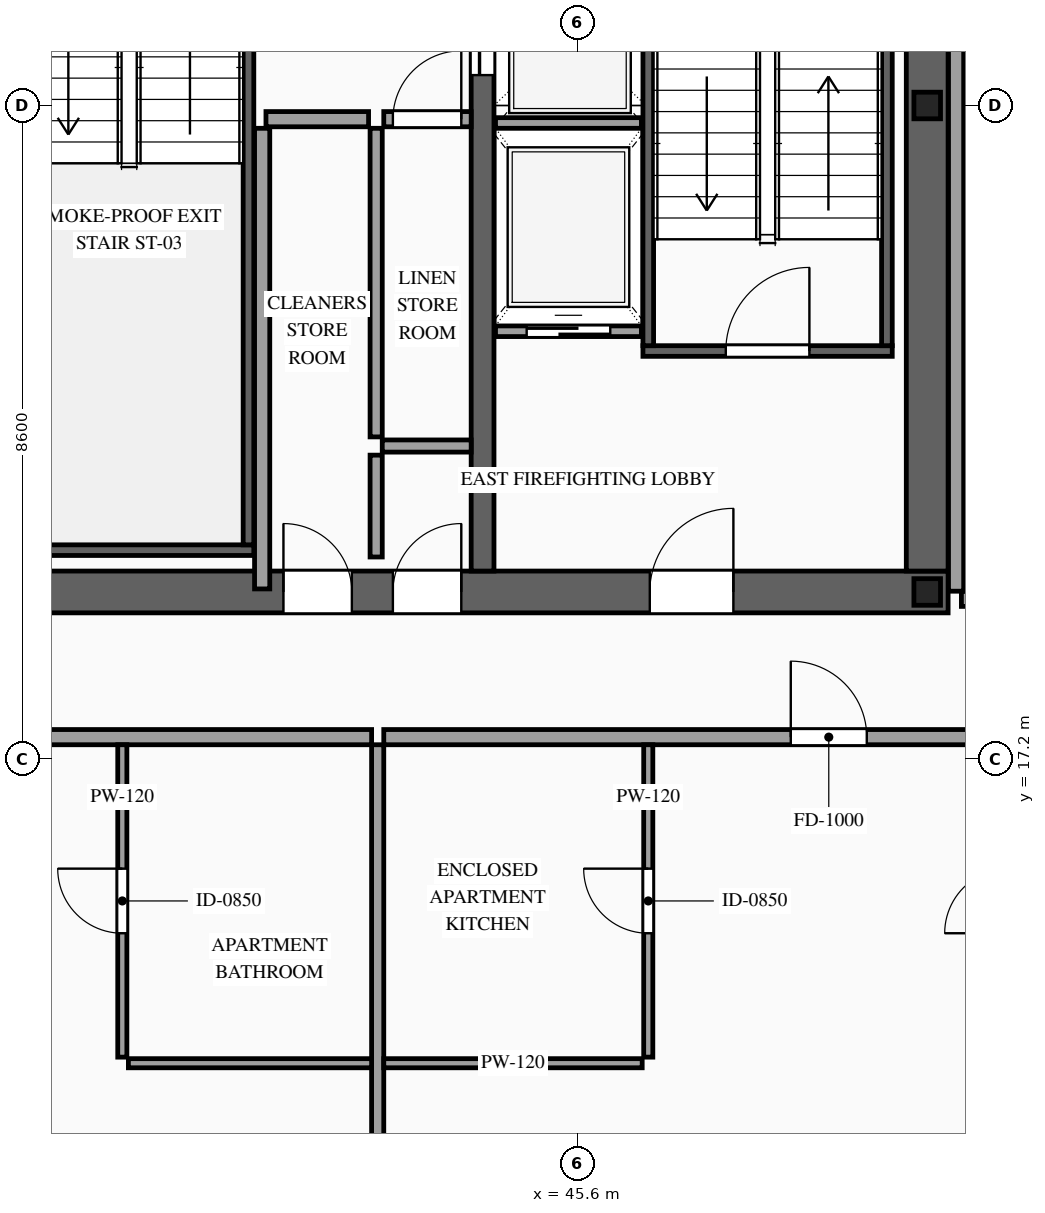
"""IFC4 building model, lengths in metres.
Left out: names, types, materials, properties, quantities, classifications, styles, units other than length and angle.
Written with IfcOpenShell. Run it as: python <this file> out.ifc"""

import sys

from ifc_helpers import new_model, si_unit, direction, frame, frame_2d, origin, origin_2d, place, context, subcontext, project, spatial, rectangle, i_section, extrude, source, transform, mapped, element, fill, save


model = new_model("IFC4")
c1 = context("Model", 3, precision=1e-05, world=origin(), true_north=direction((0.0, 1.0)))
c2 = subcontext(c1, "Body", "Model", "MODEL_VIEW")
j1 = project(units=[si_unit("LENGTHUNIT", "METRE"), si_unit("PLANEANGLEUNIT", "RADIAN")], contexts=[c1])
p1 = place(None, origin())
s1 = spatial("IfcSite", under=j1, at=p1, CompositionType="ELEMENT")
p2 = place(p1, origin())
s2 = spatial("IfcBuilding", under=s1, at=p2, CompositionType="ELEMENT")
p3 = place(p2, frame((0.0, 0.0, 275.1)))
s3 = spatial("IfcBuildingStorey", under=s2, at=p3, CompositionType="ELEMENT", Elevation=275.1)
p4 = place(p3, frame((23.525, 19.4, 0.0), z_axis=(0.0, 0.0, 1.0), x_axis=(1.0, 0.0, 0.0)))
e1 = element("IfcWall", 1, at=p4, inside=s3, PredefinedType="SHEAR", context=c2, shape_type="SweptSolid", body=[
    extrude(rectangle(XDim=26.95, YDim=0.55, at=frame_2d((13.475, 0.0))), origin(), (0.0, 0.0, 1.0), 3.5),
])
p5 = place(p4, frame((1.925, 0.0, 0.0)))
e2 = element("IfcOpeningElement", 2, at=p5, cuts=e1, PredefinedType="OPENING", context=c2, shape_type="SweptSolid", body=[
    extrude(rectangle(XDim=1.1, YDim=2.2, at=frame_2d((0.55, 1.1))), frame((0.0, 0.29, 0.0), z_axis=(0.0, -1.0, 0.0), x_axis=(1.0, 0.0, 0.0)), (0.0, 0.0, 1.0), 0.58),
])
p6 = place(p4, frame((9.825, 0.0, 0.0)))
e3 = element("IfcOpeningElement", 3, at=p6, cuts=e1, PredefinedType="OPENING", context=c2, shape_type="SweptSolid", body=[
    extrude(rectangle(XDim=1.1, YDim=2.2, at=frame_2d((0.55, 1.1))), frame((0.0, 0.29, 0.0), z_axis=(0.0, -1.0, 0.0), x_axis=(1.0, 0.0, 0.0)), (0.0, 0.0, 1.0), 0.58),
])
p7 = place(p4, frame((23.025, 0.0, 0.0)))
e4 = element("IfcOpeningElement", 4, at=p7, cuts=e1, PredefinedType="OPENING", context=c2, shape_type="SweptSolid", body=[
    extrude(rectangle(XDim=1.1, YDim=2.2, at=frame_2d((0.55, 1.1))), frame((0.0, 0.29, 0.0), z_axis=(0.0, -1.0, 0.0), x_axis=(1.0, 0.0, 0.0)), (0.0, 0.0, 1.0), 0.58),
])
p8 = place(p4, frame((19.645, 0.0, 0.0)))
e5 = element("IfcOpeningElement", 5, at=p8, cuts=e1, PredefinedType="OPENING", context=c2, shape_type="SweptSolid", body=[
    extrude(rectangle(XDim=0.9, YDim=2.15, at=frame_2d((0.45, 1.075))), frame((0.0, 0.29, 0.0), z_axis=(0.0, -1.0, 0.0), x_axis=(1.0, 0.0, 0.0)), (0.0, 0.0, 1.0), 0.58),
])
p9 = place(p4, frame((18.205, 0.0, 0.0)))
e6 = element("IfcOpeningElement", 6, at=p9, cuts=e1, PredefinedType="OPENING", context=c2, shape_type="SweptSolid", body=[
    extrude(rectangle(XDim=0.9, YDim=2.15, at=frame_2d((0.45, 1.075))), frame((0.0, 0.29, 0.0), z_axis=(0.0, -1.0, 0.0), x_axis=(1.0, 0.0, 0.0)), (0.0, 0.0, 1.0), 0.58),
])
m1 = source(origin(), c2, "Body", "SweptSolid", [
    extrude(rectangle(XDim=12.25, YDim=0.55, at=frame_2d((6.125, 0.0))), origin(), (0.0, 0.0, 1.0), 3.5),
])
p10 = place(p3, frame((50.2, 19.675, 0.0), z_axis=(0.0, 0.0, 1.0), x_axis=(0.0, 1.0, 0.0)))
e7 = element("IfcWall", 7, at=p10, inside=s3, PredefinedType="SHEAR", context=c2, shape_type="MappedRepresentation", body=[
    mapped(m1, transform((0.0, 0.0, 0.0), scale=1.0)),
])
p11 = place(p3, frame((44.35, 19.675, 0.0), z_axis=(0.0, 0.0, 1.0), x_axis=(0.0, 1.0, 0.0)))
e8 = element("IfcWall", 8, at=p11, inside=s3, PredefinedType="SOLIDWALL", context=c2, shape_type="SweptSolid", body=[
    extrude(rectangle(XDim=12.25, YDim=0.3, at=frame_2d((6.125, 0.0))), origin(), (0.0, 0.0, 1.0), 3.5),
])
p12 = place(p11, frame((6.525, 0.0, 0.0)))
e9 = element("IfcOpeningElement", 9, at=p12, cuts=e8, PredefinedType="OPENING", context=c2, shape_type="SweptSolid", body=[
    extrude(rectangle(XDim=1.1, YDim=2.2, at=frame_2d((0.55, 1.1))), frame((0.0, 0.165, 0.0), z_axis=(0.0, -1.0, 0.0), x_axis=(1.0, 0.0, 0.0)), (0.0, 0.0, 1.0), 0.33),
])
p13 = place(p11, frame((8.625, 0.0, 0.0)))
e10 = element("IfcOpeningElement", 10, at=p13, cuts=e8, PredefinedType="OPENING", context=c2, shape_type="SweptSolid", body=[
    extrude(rectangle(XDim=1.1, YDim=2.2, at=frame_2d((0.55, 1.1))), frame((0.0, 0.165, 0.0), z_axis=(0.0, -1.0, 0.0), x_axis=(1.0, 0.0, 0.0)), (0.0, 0.0, 1.0), 0.33),
])
p14 = place(p11, frame((10.725, 0.0, 0.0)))
e11 = element("IfcOpeningElement", 11, at=p14, cuts=e8, PredefinedType="OPENING", context=c2, shape_type="SweptSolid", body=[
    extrude(rectangle(XDim=1.1, YDim=2.2, at=frame_2d((0.55, 1.1))), frame((0.0, 0.165, 0.0), z_axis=(0.0, -1.0, 0.0), x_axis=(1.0, 0.0, 0.0)), (0.0, 0.0, 1.0), 0.33),
])
m2 = source(origin(), c2, "Body", "SweptSolid", [
    extrude(i_section(OverallWidth=0.35, OverallDepth=0.35, WebThickness=0.012, FlangeThickness=0.019, at=origin_2d()), origin(), (0.0, 0.0, 1.0), 3.5),
])
for number, where, z_axis, x_axis in (
    (12, (50.2, 19.4, 0.0), (0.0, 0.0, 1.0), (1.0, 0.0, 0.0)),
    (13, (50.2, 25.8, 0.0), (0.0, 0.0, 1.0), (1.0, 0.0, 0.0)),
):
    element("IfcColumn", number, at=place(p3, frame(where, z_axis=z_axis, x_axis=x_axis)), inside=s3, PredefinedType="COLUMN", context=c2, shape_type="MappedRepresentation", body=[
        mapped(m2, transform((0.0, 0.0, 0.0), scale=1.0)),
    ])
p15 = place(p3, frame((44.52, 22.83, 0.0), z_axis=(0.0, 0.0, 1.0), x_axis=(1.0, 0.0, 0.0)))
e14 = element("IfcWall", 14, at=p15, inside=s3, PredefinedType="SOLIDWALL", context=c2, shape_type="SweptSolid", body=[
    extrude(rectangle(XDim=1.92, YDim=0.14, at=frame_2d((0.96, 0.0))), origin(), (0.0, 0.0, 1.0), 3.28),
])
p16 = place(p15, frame((0.41, 0.0, 0.0)))
e15 = element("IfcOpeningElement", 15, at=p16, cuts=e14, PredefinedType="OPENING", context=c2, shape_type="SweptSolid", body=[
    extrude(rectangle(XDim=1.1, YDim=2.2, at=frame_2d((0.55, 1.1))), frame((0.0, 0.085, 0.0), z_axis=(0.0, -1.0, 0.0), x_axis=(1.0, 0.0, 0.0)), (0.0, 0.0, 1.0), 0.17),
])
m3 = source(origin(), c2, "Body", "SweptSolid", [
    extrude(rectangle(XDim=1.92, YDim=0.14, at=frame_2d((0.96, 0.0))), origin(), (0.0, 0.0, 1.0), 3.28),
])
p17 = place(p3, frame((44.52, 25.57, 0.0), z_axis=(0.0, 0.0, 1.0), x_axis=(1.0, 0.0, 0.0)))
e16 = element("IfcWall", 16, at=p17, inside=s3, PredefinedType="SOLIDWALL", context=c2, shape_type="MappedRepresentation", body=[
    mapped(m3, transform((0.0, 0.0, 0.0), scale=1.0)),
])
p18 = place(p3, frame((46.46, 22.57, 0.0), z_axis=(0.0, 0.0, 1.0), x_axis=(1.0, 0.0, 0.0)))
e17 = element("IfcWall", 17, at=p18, inside=s3, PredefinedType="SOLIDWALL", context=c2, shape_type="SweptSolid", body=[
    extrude(rectangle(XDim=3.28, YDim=0.14, at=frame_2d((1.64, 0.0))), origin(), (0.0, 0.0, 1.0), 3.28),
])
p19 = place(p18, frame((1.09, 0.0, 0.0)))
e18 = element("IfcOpeningElement", 18, at=p19, cuts=e17, PredefinedType="OPENING", context=c2, shape_type="SweptSolid", body=[
    extrude(rectangle(XDim=1.1, YDim=2.2, at=frame_2d((0.55, 1.1))), frame((0.0, 0.085, 0.0), z_axis=(0.0, -1.0, 0.0), x_axis=(1.0, 0.0, 0.0)), (0.0, 0.0, 1.0), 0.17),
])
m4 = source(origin(), c2, "Body", "SweptSolid", [
    extrude(rectangle(XDim=8.94, YDim=0.14, at=frame_2d((4.47, 0.0))), origin(), (0.0, 0.0, 1.0), 3.28),
])
for number, where, z_axis, x_axis in (
    (19, (46.53, 22.64, 0.0), (0.0, 0.0, 1.0), (0.0, 1.0, 0.0)),
    (20, (49.67, 22.64, 0.0), (0.0, 0.0, 1.0), (0.0, 1.0, 0.0)),
):
    element("IfcWall", number, at=place(p3, frame(where, z_axis=z_axis, x_axis=x_axis)), inside=s3, PredefinedType="SOLIDWALL", context=c2, shape_type="MappedRepresentation", body=[
        mapped(m4, transform((0.0, 0.0, 0.0), scale=1.0)),
    ])
m5 = source(origin(), c2, "Body", "SweptSolid", [
    extrude(rectangle(XDim=3.14, YDim=0.14, at=frame_2d((1.57, 0.0))), origin(), (0.0, 0.0, 1.0), 3.28),
])
p20 = place(p3, frame((38.2, 19.95, 0.0), z_axis=(0.0, 0.0, 1.0), x_axis=(1.0, 0.0, 0.0)))
e21 = element("IfcWall", 21, at=p20, inside=s3, PredefinedType="SOLIDWALL", context=c2, shape_type="MappedRepresentation", body=[
    mapped(m5, transform((0.0, 0.0, 0.0), scale=1.0)),
])
m6 = source(origin(), c2, "Body", "SweptSolid", [
    extrude(rectangle(XDim=8.94, YDim=0.14, at=frame_2d((4.47, 0.0))), origin(), (0.0, 0.0, 1.0), 3.28),
])
p21 = place(p3, frame((41.27, 20.02, 0.0), z_axis=(0.0, 0.0, 1.0), x_axis=(0.0, 1.0, 0.0)))
e22 = element("IfcWall", 22, at=p21, inside=s3, PredefinedType="SOLIDWALL", context=c2, shape_type="MappedRepresentation", body=[
    mapped(m6, transform((0.0, 0.0, 0.0), scale=1.0)),
])
m7 = source(origin(), c2, "Body", "SweptSolid", [
    extrude(rectangle(XDim=1.34, YDim=0.16, at=frame_2d((0.67, 0.0))), origin(), (0.0, 0.0, 1.0), 3.28),
])
p22 = place(p3, frame((42.95, 19.86, 0.0), z_axis=(0.0, 0.0, 1.0), x_axis=(0.0, 1.0, 0.0)))
e23 = element("IfcWall", 23, at=p22, inside=s3, PredefinedType="PARTITIONING", context=c2, shape_type="MappedRepresentation", body=[
    mapped(m7, transform((0.0, 0.0, 0.0), scale=1.0)),
])
m8 = source(origin(), c2, "Body", "SweptSolid", [
    extrude(rectangle(XDim=1.17, YDim=0.16, at=frame_2d((0.585, 0.0))), origin(), (0.0, 0.0, 1.0), 3.28),
])
p23 = place(p3, frame((43.03, 21.32, 0.0), z_axis=(0.0, 0.0, 1.0), x_axis=(1.0, 0.0, 0.0)))
e24 = element("IfcWall", 24, at=p23, inside=s3, PredefinedType="PARTITIONING", context=c2, shape_type="MappedRepresentation", body=[
    mapped(m8, transform((0.0, 0.0, 0.0), scale=1.0)),
])
m9 = source(origin(), c2, "Body", "SweptSolid", [
    extrude(rectangle(XDim=6.06, YDim=0.2, at=frame_2d((3.03, 0.0))), origin(), (0.0, 0.0, 1.0), 3.28),
])
p24 = place(p3, frame((41.45, 19.44, 0.0), z_axis=(0.0, 0.0, 1.0), x_axis=(0.0, 1.0, 0.0)))
e25 = element("IfcWall", 25, at=p24, inside=s3, PredefinedType="PARTITIONING", context=c2, shape_type="MappedRepresentation", body=[
    mapped(m9, transform((0.0, 0.0, 0.0), scale=1.0)),
])
m10 = source(origin(), c2, "Body", "SweptSolid", [
    extrude(rectangle(XDim=1.35, YDim=0.2, at=frame_2d((0.675, 0.0))), origin(), (0.0, 0.0, 1.0), 3.28),
])
p25 = place(p3, frame((41.5, 25.62, 0.0), z_axis=(0.0, 0.0, 1.0), x_axis=(1.0, 0.0, 0.0)))
e26 = element("IfcWall", 26, at=p25, inside=s3, PredefinedType="PARTITIONING", context=c2, shape_type="MappedRepresentation", body=[
    mapped(m10, transform((0.0, 0.0, 0.0), scale=1.0)),
])
m11 = source(origin(), c2, "Body", "SweptSolid", [
    extrude(rectangle(XDim=4.06, YDim=0.16, at=frame_2d((2.03, 0.0))), origin(), (0.0, 0.0, 1.0), 3.28),
])
p26 = place(p3, frame((42.95, 21.44, 0.0), z_axis=(0.0, 0.0, 1.0), x_axis=(0.0, 1.0, 0.0)))
e27 = element("IfcWall", 27, at=p26, inside=s3, PredefinedType="PARTITIONING", context=c2, shape_type="MappedRepresentation", body=[
    mapped(m11, transform((0.0, 0.0, 0.0), scale=1.0)),
])
p27 = place(p3, frame((43.05, 25.62, 0.0), z_axis=(0.0, 0.0, 1.0), x_axis=(1.0, 0.0, 0.0)))
e28 = element("IfcWall", 28, at=p27, inside=s3, PredefinedType="PARTITIONING", context=c2, shape_type="SweptSolid", body=[
    extrude(rectangle(XDim=1.15, YDim=0.2, at=frame_2d((0.575, 0.0))), origin(), (0.0, 0.0, 1.0), 3.28),
])
p28 = place(p27, frame((0.12, 0.0, 0.0)))
e29 = element("IfcOpeningElement", 29, at=p28, cuts=e28, PredefinedType="OPENING", context=c2, shape_type="SweptSolid", body=[
    extrude(rectangle(XDim=0.9, YDim=2.15, at=frame_2d((0.45, 1.075))), frame((0.0, 0.115, 0.0), z_axis=(0.0, -1.0, 0.0), x_axis=(1.0, 0.0, 0.0)), (0.0, 0.0, 1.0), 0.23),
])
p29 = place(p3, frame((31.461, 17.49, 0.0), z_axis=(0.0, 0.0, 1.0), x_axis=(1.0, 0.0, 0.0)))
e30 = element("IfcWall", 30, at=p29, inside=s3, PredefinedType="PARTITIONING", context=c2, shape_type="SweptSolid", body=[
    extrude(rectangle(XDim=11.429, YDim=0.2, at=frame_2d((5.714, 0.0))), origin(), (0.0, 0.0, 1.0), 3.28),
])
p30 = place(p29, frame((5.314, 0.0, 0.0)))
e31 = element("IfcOpeningElement", 31, at=p30, cuts=e30, PredefinedType="OPENING", context=c2, shape_type="SweptSolid", body=[
    extrude(rectangle(XDim=1.0, YDim=2.2, at=frame_2d((0.5, 1.1))), frame((0.0, 0.115, 0.0), z_axis=(0.0, -1.0, 0.0), x_axis=(1.0, 0.0, 0.0)), (0.0, 0.0, 1.0), 0.23),
])
m12 = source(origin(), c2, "Body", "SweptSolid", [
    extrude(rectangle(XDim=12.04, YDim=0.16, at=frame_2d((6.02, 0.0))), origin(), (0.0, 0.0, 1.0), 3.28),
])
p31 = place(p3, frame((42.97, 5.35, 0.0), z_axis=(0.0, 0.0, 1.0), x_axis=(0.0, 1.0, 0.0)))
e32 = element("IfcWall", 32, at=p31, inside=s3, PredefinedType="PARTITIONING", context=c2, shape_type="MappedRepresentation", body=[
    mapped(m12, transform((0.0, 0.0, 0.0), scale=1.0)),
])
m13 = source(origin(), c2, "Body", "SweptSolid", [
    extrude(rectangle(XDim=3.2, YDim=0.12, at=frame_2d((1.6, 0.0))), origin(), (0.0, 0.0, 1.0), 3.28),
])
p32 = place(p3, frame((39.69, 13.2, 0.0), z_axis=(0.0, 0.0, 1.0), x_axis=(1.0, 0.0, 0.0)))
e33 = element("IfcWall", 33, at=p32, inside=s3, PredefinedType="PARTITIONING", context=c2, shape_type="MappedRepresentation", body=[
    mapped(m13, transform((0.0, 0.0, 0.0), scale=1.0)),
])
p33 = place(p3, frame((39.61, 13.28, 0.0), z_axis=(0.0, 0.0, 1.0), x_axis=(0.0, 1.0, 0.0)))
e34 = element("IfcWall", 34, at=p33, inside=s3, PredefinedType="PARTITIONING", context=c2, shape_type="SweptSolid", body=[
    extrude(rectangle(XDim=4.11, YDim=0.12, at=frame_2d((2.055, 0.0))), origin(), (0.0, 0.0, 1.0), 3.28),
])
p34 = place(p33, frame((1.63, 0.0, 0.0)))
e35 = element("IfcOpeningElement", 35, at=p34, cuts=e34, PredefinedType="OPENING", context=c2, shape_type="SweptSolid", body=[
    extrude(rectangle(XDim=0.85, YDim=2.1, at=frame_2d((0.425, 1.05))), frame((0.0, 0.075, 0.0), z_axis=(0.0, -1.0, 0.0), x_axis=(1.0, 0.0, 0.0)), (0.0, 0.0, 1.0), 0.15),
])
p35 = place(p3, frame((43.05, 17.49, 0.0), z_axis=(0.0, 0.0, 1.0), x_axis=(1.0, 0.0, 0.0)))
e36 = element("IfcWall", 36, at=p35, inside=s3, PredefinedType="PARTITIONING", context=c2, shape_type="SweptSolid", body=[
    extrude(rectangle(XDim=11.51, YDim=0.2, at=frame_2d((5.755, 0.0))), origin(), (0.0, 0.0, 1.0), 3.28),
])
p36 = place(p35, frame((5.355, 0.0, 0.0)))
e37 = element("IfcOpeningElement", 37, at=p36, cuts=e36, PredefinedType="OPENING", context=c2, shape_type="SweptSolid", body=[
    extrude(rectangle(XDim=1.0, YDim=2.2, at=frame_2d((0.5, 1.1))), frame((0.0, 0.115, 0.0), z_axis=(0.0, -1.0, 0.0), x_axis=(1.0, 0.0, 0.0)), (0.0, 0.0, 1.0), 0.23),
])
m14 = source(origin(), c2, "Body", "SweptSolid", [
    extrude(rectangle(XDim=3.4, YDim=0.12, at=frame_2d((1.7, 0.0))), origin(), (0.0, 0.0, 1.0), 3.28),
])
p37 = place(p3, frame((43.05, 13.2, 0.0), z_axis=(0.0, 0.0, 1.0), x_axis=(1.0, 0.0, 0.0)))
e38 = element("IfcWall", 38, at=p37, inside=s3, PredefinedType="PARTITIONING", context=c2, shape_type="MappedRepresentation", body=[
    mapped(m14, transform((0.0, 0.0, 0.0), scale=1.0)),
])
p38 = place(p3, frame((46.53, 13.28, 0.0), z_axis=(0.0, 0.0, 1.0), x_axis=(0.0, 1.0, 0.0)))
e39 = element("IfcWall", 39, at=p38, inside=s3, PredefinedType="PARTITIONING", context=c2, shape_type="SweptSolid", body=[
    extrude(rectangle(XDim=4.11, YDim=0.12, at=frame_2d((2.055, 0.0))), origin(), (0.0, 0.0, 1.0), 3.28),
])
p39 = place(p38, frame((1.63, 0.0, 0.0)))
e40 = element("IfcOpeningElement", 40, at=p39, cuts=e39, PredefinedType="OPENING", context=c2, shape_type="SweptSolid", body=[
    extrude(rectangle(XDim=0.85, YDim=2.1, at=frame_2d((0.425, 1.05))), frame((0.0, 0.075, 0.0), z_axis=(0.0, -1.0, 0.0), x_axis=(1.0, 0.0, 0.0)), (0.0, 0.0, 1.0), 0.15),
])
p40 = place(p3, frame((50.65, 19.31, 0.0), z_axis=(0.0, 0.0, 1.0), x_axis=(1.0, 0.0, 0.0)))
e41 = element("IfcWall", 41, at=p40, inside=s3, PredefinedType="PARTITIONING", context=c2, shape_type="SweptSolid", body=[
    extrude(rectangle(XDim=6.8, YDim=0.2, at=frame_2d((3.4, 0.0))), origin(), (0.0, 0.0, 1.0), 2.825),
])
p41 = place(p40, frame((0.4, 0.0, 0.0)))
e42 = element("IfcOpeningElement", 42, at=p41, cuts=e41, PredefinedType="OPENING", context=c2, shape_type="SweptSolid", body=[
    extrude(rectangle(XDim=1.0, YDim=2.2, at=frame_2d((0.5, 1.1))), frame((0.0, 0.115, 0.0), z_axis=(0.0, -1.0, 0.0), x_axis=(1.0, 0.0, 0.0)), (0.0, 0.0, 1.0), 0.23),
])
m15 = source(origin(), c2, "Body", "SweptSolid", [
    extrude(rectangle(XDim=12.78, YDim=0.2, at=frame_2d((6.39, 0.0))), origin(), (0.0, 0.0, 1.0), 3.28),
])
p42 = place(p3, frame((50.58, 19.41, 0.0), z_axis=(0.0, 0.0, 1.0), x_axis=(0.0, 1.0, 0.0)))
e43 = element("IfcWall", 43, at=p42, inside=s3, PredefinedType="PARTITIONING", context=c2, shape_type="MappedRepresentation", body=[
    mapped(m15, transform((0.0, 0.0, 0.0), scale=1.0)),
])
m16 = source(origin(), c2, "Body", "SweptSolid", [
    extrude(rectangle(XDim=1.1, YDim=2.2, at=frame_2d((0.55, 1.1))), frame((0.0, 0.025, 0.0), z_axis=(0.0, -1.0, 0.0), x_axis=(1.0, 0.0, 0.0)), (0.0, 0.0, 1.0), 0.05),
])
p43 = place(p16, origin())
e44 = element("IfcDoor", 44, at=p43, inside=s3, OperationType="SLIDING_TO_RIGHT", PredefinedType="DOOR", context=c2, shape_type="MappedRepresentation", body=[
    mapped(m16, transform((0.0, 0.0, 0.0), scale=1.0)),
])
fill(e15, e44)
p44 = place(p12, origin())
e45 = element("IfcDoor", 45, at=p44, inside=s3, OperationType="SLIDING_TO_LEFT", PredefinedType="DOOR", context=c2, shape_type="MappedRepresentation", body=[
    mapped(m16, transform((0.0, 0.0, 0.0), scale=1.0)),
])
fill(e9, e45)
m17 = source(origin(), c2, "Body", "SweptSolid", [
    extrude(rectangle(XDim=1.1, YDim=2.2, at=frame_2d((0.55, 1.1))), frame((0.0, 0.025, 0.0), z_axis=(0.0, -1.0, 0.0), x_axis=(1.0, 0.0, 0.0)), (0.0, 0.0, 1.0), 0.05),
])
p45 = place(p19, origin())
e46 = element("IfcDoor", 46, at=p45, inside=s3, OperationType="SINGLE_SWING_RIGHT", PredefinedType="DOOR", context=c2, shape_type="MappedRepresentation", body=[
    mapped(m17, transform((0.0, 0.0, 0.0), scale=1.0)),
])
fill(e18, e46)
p46 = place(p7, origin())
e47 = element("IfcDoor", 47, at=p46, inside=s3, OperationType="SINGLE_SWING_RIGHT", PredefinedType="DOOR", context=c2, shape_type="MappedRepresentation", body=[
    mapped(m17, transform((0.0, 0.0, 0.0), scale=1.0)),
])
fill(e4, e47)
m18 = source(origin(), c2, "Body", "SweptSolid", [
    extrude(rectangle(XDim=0.9, YDim=2.15, at=frame_2d((0.45, 1.075))), frame((0.0, 0.025, 0.0), z_axis=(0.0, -1.0, 0.0), x_axis=(1.0, 0.0, 0.0)), (0.0, 0.0, 1.0), 0.05),
])
p47 = place(p8, origin())
e48 = element("IfcDoor", 48, at=p47, inside=s3, OperationType="SINGLE_SWING_RIGHT", PredefinedType="DOOR", context=c2, shape_type="MappedRepresentation", body=[
    mapped(m18, transform((0.0, 0.0, 0.0), scale=1.0)),
])
fill(e5, e48)
p48 = place(p9, origin())
e49 = element("IfcDoor", 49, at=p48, inside=s3, OperationType="SINGLE_SWING_LEFT", PredefinedType="DOOR", context=c2, shape_type="MappedRepresentation", body=[
    mapped(m18, transform((0.0, 0.0, 0.0), scale=1.0)),
])
fill(e6, e49)
p49 = place(p28, origin())
e50 = element("IfcDoor", 50, at=p49, inside=s3, OperationType="SINGLE_SWING_RIGHT", PredefinedType="DOOR", context=c2, shape_type="MappedRepresentation", body=[
    mapped(m18, transform((0.0, 0.0, 0.0), scale=1.0)),
])
fill(e29, e50)
m19 = source(origin(), c2, "Body", "SweptSolid", [
    extrude(rectangle(XDim=0.85, YDim=2.1, at=frame_2d((0.425, 1.05))), frame((0.0, 0.025, 0.0), z_axis=(0.0, -1.0, 0.0), x_axis=(1.0, 0.0, 0.0)), (0.0, 0.0, 1.0), 0.05),
])
p50 = place(p34, origin())
e51 = element("IfcDoor", 51, at=p50, inside=s3, OperationType="SINGLE_SWING_RIGHT", PredefinedType="DOOR", context=c2, shape_type="MappedRepresentation", body=[
    mapped(m19, transform((0.0, 0.0, 0.0), scale=1.0)),
])
fill(e35, e51)
m20 = source(origin(), c2, "Body", "SweptSolid", [
    extrude(rectangle(XDim=1.0, YDim=2.2, at=frame_2d((0.5, 1.1))), frame((0.0, 0.025, 0.0), z_axis=(0.0, -1.0, 0.0), x_axis=(1.0, 0.0, 0.0)), (0.0, 0.0, 1.0), 0.05),
])
p51 = place(p36, origin())
e52 = element("IfcDoor", 52, at=p51, inside=s3, OperationType="SINGLE_SWING_LEFT", PredefinedType="DOOR", context=c2, shape_type="MappedRepresentation", body=[
    mapped(m20, transform((0.0, 0.0, 0.0), scale=1.0)),
])
fill(e37, e52)
p52 = place(p39, origin())
e53 = element("IfcDoor", 53, at=p52, inside=s3, OperationType="SINGLE_SWING_RIGHT", PredefinedType="DOOR", context=c2, shape_type="MappedRepresentation", body=[
    mapped(m19, transform((0.0, 0.0, 0.0), scale=1.0)),
])
fill(e40, e53)
save(model, sys.argv[1])
